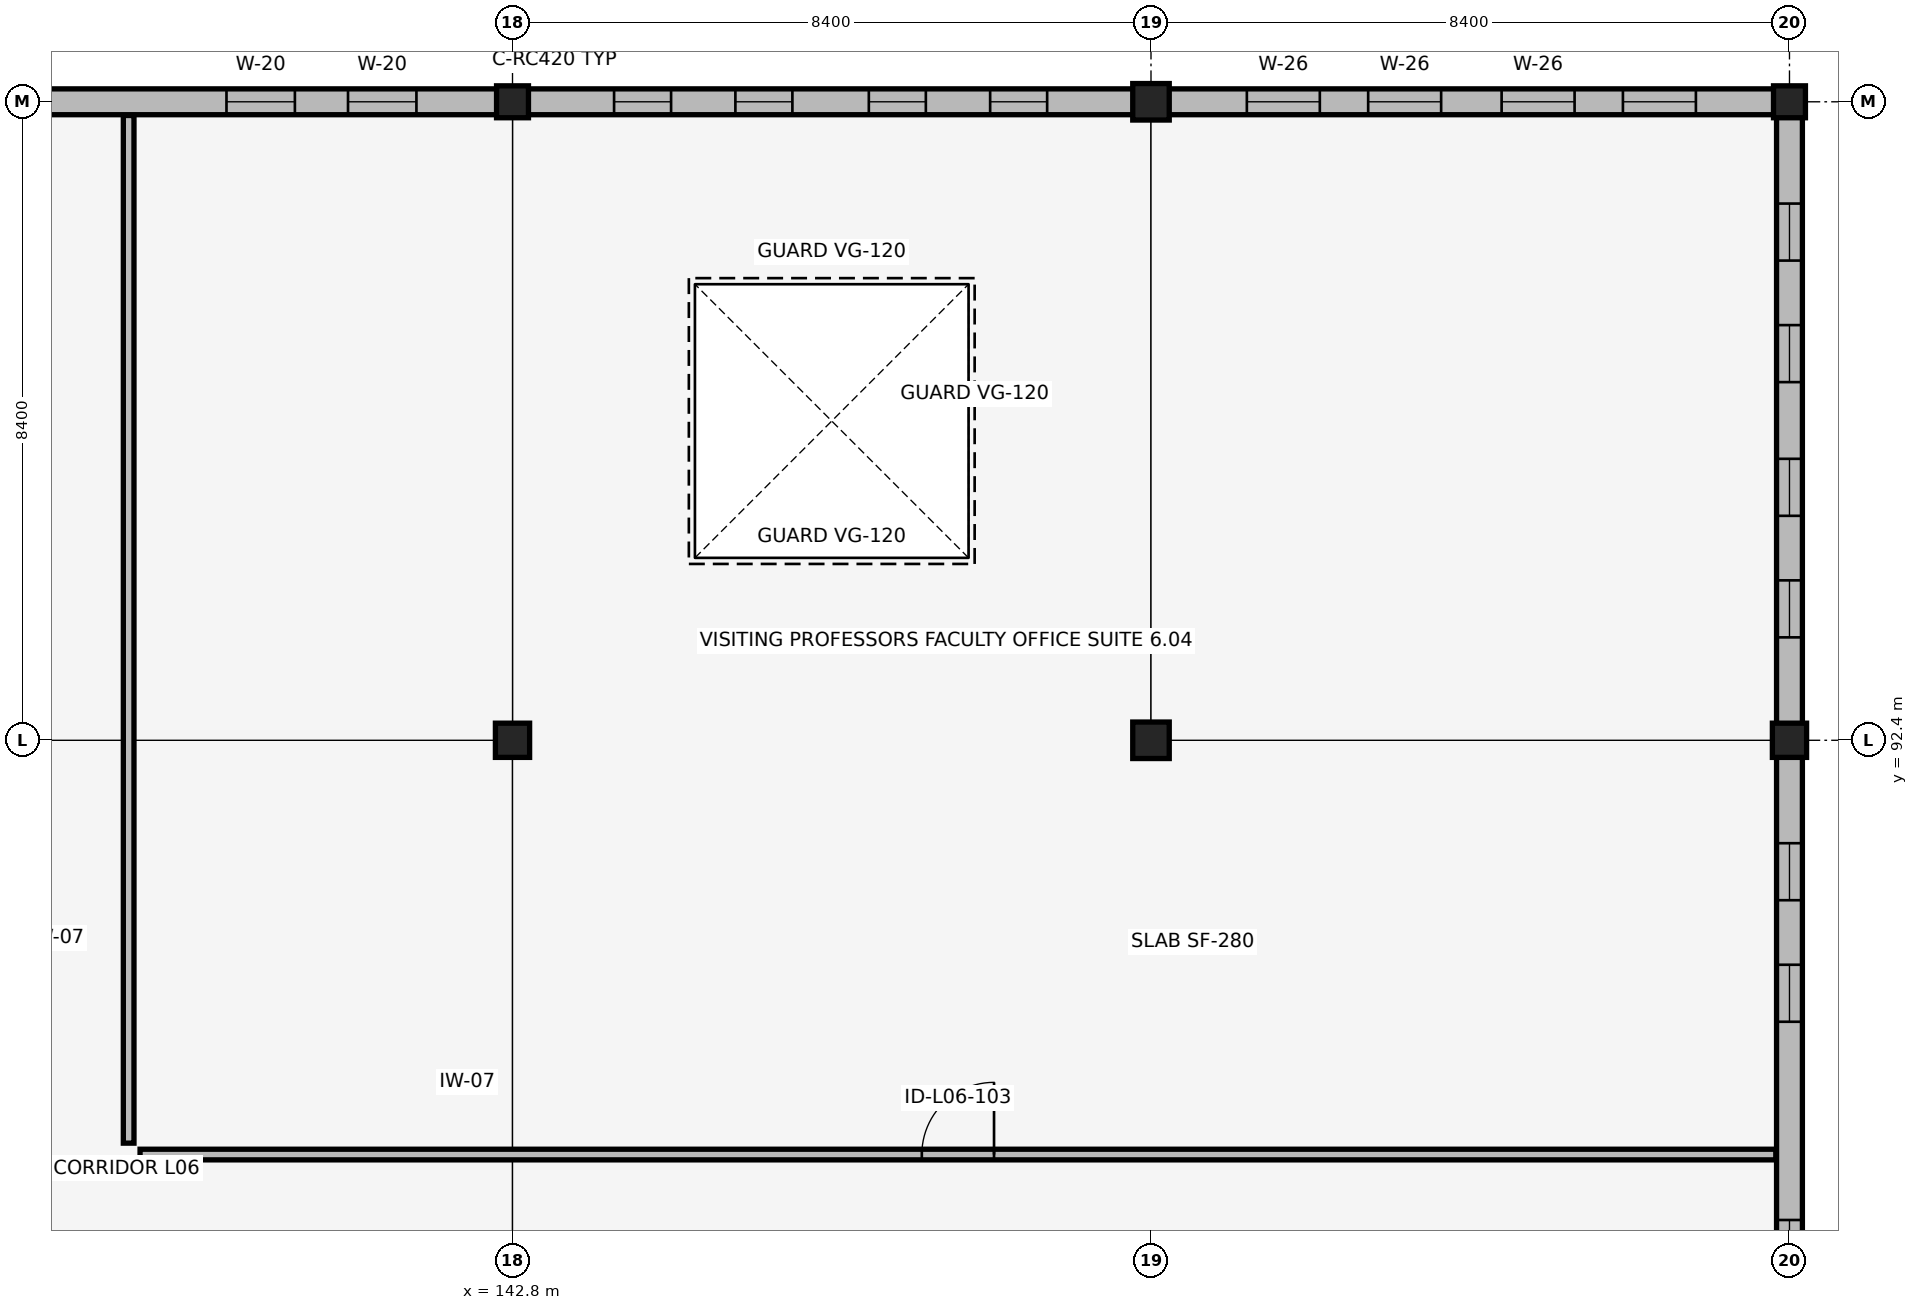
"""IFC4 building model, lengths in metres.
Left out: names, types, materials, properties, quantities, classifications, styles, units other than length and angle.
Written with IfcOpenShell. Run it as: python <this file> out.ifc"""

import sys

from ifc_helpers import new_model, si_unit, direction, frame, frame_2d, origin, origin_2d, place, context, subcontext, project, spatial, rectangle, extrude, element, fill, save


model = new_model("IFC4")
c1 = context("Model", 3, precision=1e-05, world=origin(), true_north=direction((0.0, 1.0)))
c2 = subcontext(c1, "Body", "Model", "MODEL_VIEW")
j1 = project(units=[si_unit("LENGTHUNIT", "METRE"), si_unit("PLANEANGLEUNIT", "RADIAN")], contexts=[c1])
p1 = place(None, origin())
s1 = spatial("IfcSite", under=j1, at=p1, CompositionType="ELEMENT")
p2 = place(p1, origin())
s2 = spatial("IfcBuilding", under=s1, at=p2, CompositionType="ELEMENT")
p3 = place(p2, frame((0.0, 0.0, 26.18)))
s3 = spatial("IfcBuildingStorey", under=s2, at=p3, CompositionType="ELEMENT", Elevation=26.18)
p4 = place(p3, frame((142.8, 92.4, 0.0), z_axis=(0.0, 0.0, 1.0), x_axis=(1.0, 0.0, 0.0)))
e1 = element("IfcColumn", 1, at=p4, inside=s3, PredefinedType="COLUMN", context=c2, shape_type="SweptSolid", body=[
    extrude(rectangle(XDim=0.45, YDim=0.45, at=origin_2d()), origin(), (0.0, 0.0, 1.0), 3.84),
])
p5 = place(p3, frame((142.8, 100.8, 0.0), z_axis=(0.0, 0.0, 1.0), x_axis=(1.0, 0.0, 0.0)))
e2 = element("IfcColumn", 2, at=p5, inside=s3, PredefinedType="COLUMN", context=c2, shape_type="SweptSolid", body=[
    extrude(rectangle(XDim=0.42, YDim=0.42, at=origin_2d()), origin(), (0.0, 0.0, 1.0), 3.84),
])
for number, where, z_axis, x_axis in (
    (3, (151.2, 92.4, 0.0), (0.0, 0.0, 1.0), (1.0, 0.0, 0.0)),
    (4, (151.2, 100.8, 0.0), (0.0, 0.0, 1.0), (1.0, 0.0, 0.0)),
):
    element("IfcColumn", number, at=place(p3, frame(where, z_axis=z_axis, x_axis=x_axis)), inside=s3, PredefinedType="COLUMN", context=c2, shape_type="SweptSolid", body=[
        extrude(rectangle(XDim=0.48, YDim=0.48, at=origin_2d()), origin(), (0.0, 0.0, 1.0), 3.84),
    ])
p6 = place(p3, frame((159.6, 92.4, 0.0), z_axis=(0.0, 0.0, 1.0), x_axis=(1.0, 0.0, 0.0)))
e5 = element("IfcColumn", 5, at=p6, inside=s3, PredefinedType="COLUMN", context=c2, shape_type="SweptSolid", body=[
    extrude(rectangle(XDim=0.45, YDim=0.45, at=origin_2d()), origin(), (0.0, 0.0, 1.0), 3.84),
])
p7 = place(p3, frame((159.6, 100.8, 0.0), z_axis=(0.0, 0.0, 1.0), x_axis=(1.0, 0.0, 0.0)))
e6 = element("IfcColumn", 6, at=p7, inside=s3, PredefinedType="COLUMN", context=c2, shape_type="SweptSolid", body=[
    extrude(rectangle(XDim=0.42, YDim=0.42, at=origin_2d()), origin(), (0.0, 0.0, 1.0), 3.84),
])
p8 = place(p3, frame((134.61, 100.8, 0.0), z_axis=(0.0, 0.0, 1.0), x_axis=(1.0, 0.0, 0.0)))
e7 = element("IfcWall", 7, at=p8, inside=s3, PredefinedType="SOLIDWALL", context=c2, shape_type="SweptSolid", body=[
    extrude(rectangle(XDim=7.995, YDim=0.34, at=frame_2d((3.998, 0.0))), origin(), (0.0, 0.0, 1.0), 3.84),
])
p9 = place(p8, frame((1.069, 0.0, 0.75)))
e8 = element("IfcOpeningElement", 8, at=p9, cuts=e7, PredefinedType="OPENING", context=c2, shape_type="SweptSolid", body=[
    extrude(rectangle(XDim=0.9, YDim=2.65, at=frame_2d((0.45, 1.325))), frame((0.0, 0.18, 0.0), z_axis=(0.0, -1.0, 0.0), x_axis=(1.0, 0.0, 0.0)), (0.0, 0.0, 1.0), 0.36),
])
p10 = place(p8, frame((4.427, 0.0, 0.75)))
e9 = element("IfcOpeningElement", 9, at=p10, cuts=e7, PredefinedType="OPENING", context=c2, shape_type="SweptSolid", body=[
    extrude(rectangle(XDim=0.9, YDim=2.65, at=frame_2d((0.45, 1.325))), frame((0.0, 0.18, 0.0), z_axis=(0.0, -1.0, 0.0), x_axis=(1.0, 0.0, 0.0)), (0.0, 0.0, 1.0), 0.36),
])
p11 = place(p8, frame((6.026, 0.0, 0.75)))
e10 = element("IfcOpeningElement", 10, at=p11, cuts=e7, PredefinedType="OPENING", context=c2, shape_type="SweptSolid", body=[
    extrude(rectangle(XDim=0.9, YDim=2.65, at=frame_2d((0.45, 1.325))), frame((0.0, 0.18, 0.0), z_axis=(0.0, -1.0, 0.0), x_axis=(1.0, 0.0, 0.0)), (0.0, 0.0, 1.0), 0.36),
])
p12 = place(p3, frame((142.995, 100.8, 0.0), z_axis=(0.0, 0.0, 1.0), x_axis=(1.0, 0.0, 0.0)))
e11 = element("IfcWall", 11, at=p12, inside=s3, PredefinedType="SOLIDWALL", context=c2, shape_type="SweptSolid", body=[
    extrude(rectangle(XDim=7.98, YDim=0.34, at=frame_2d((3.99, 0.0))), origin(), (0.0, 0.0, 1.0), 3.84),
])
p13 = place(p12, frame((1.141, 0.0, 0.75)))
e12 = element("IfcOpeningElement", 12, at=p13, cuts=e11, PredefinedType="OPENING", context=c2, shape_type="SweptSolid", body=[
    extrude(rectangle(XDim=0.75, YDim=2.1, at=frame_2d((0.375, 1.05))), frame((0.0, 0.18, 0.0), z_axis=(0.0, -1.0, 0.0), x_axis=(1.0, 0.0, 0.0)), (0.0, 0.0, 1.0), 0.36),
])
p14 = place(p12, frame((2.737, 0.0, 0.75)))
e13 = element("IfcOpeningElement", 13, at=p14, cuts=e11, PredefinedType="OPENING", context=c2, shape_type="SweptSolid", body=[
    extrude(rectangle(XDim=0.75, YDim=2.1, at=frame_2d((0.375, 1.05))), frame((0.0, 0.18, 0.0), z_axis=(0.0, -1.0, 0.0), x_axis=(1.0, 0.0, 0.0)), (0.0, 0.0, 1.0), 0.36),
])
p15 = place(p12, frame((4.493, 0.0, 0.75)))
e14 = element("IfcOpeningElement", 14, at=p15, cuts=e11, PredefinedType="OPENING", context=c2, shape_type="SweptSolid", body=[
    extrude(rectangle(XDim=0.75, YDim=2.1, at=frame_2d((0.375, 1.05))), frame((0.0, 0.18, 0.0), z_axis=(0.0, -1.0, 0.0), x_axis=(1.0, 0.0, 0.0)), (0.0, 0.0, 1.0), 0.36),
])
p16 = place(p12, frame((6.089, 0.0, 0.75)))
e15 = element("IfcOpeningElement", 15, at=p16, cuts=e11, PredefinedType="OPENING", context=c2, shape_type="SweptSolid", body=[
    extrude(rectangle(XDim=0.75, YDim=2.1, at=frame_2d((0.375, 1.05))), frame((0.0, 0.18, 0.0), z_axis=(0.0, -1.0, 0.0), x_axis=(1.0, 0.0, 0.0)), (0.0, 0.0, 1.0), 0.36),
])
p17 = place(p3, frame((159.6, 84.195, 0.0), z_axis=(0.0, 0.0, 1.0), x_axis=(0.0, 1.0, 0.0)))
e16 = element("IfcWall", 16, at=p17, inside=s3, PredefinedType="SOLIDWALL", context=c2, shape_type="SweptSolid", body=[
    extrude(rectangle(XDim=7.995, YDim=0.34, at=frame_2d((3.998, 0.0))), origin(), (0.0, 0.0, 1.0), 3.48),
])
p18 = place(p17, frame((1.144, 0.0, 0.75)))
e17 = element("IfcOpeningElement", 17, at=p18, cuts=e16, PredefinedType="OPENING", context=c2, shape_type="SweptSolid", body=[
    extrude(rectangle(XDim=0.75, YDim=2.1, at=frame_2d((0.375, 1.05))), frame((0.0, 0.18, 0.0), z_axis=(0.0, -1.0, 0.0), x_axis=(1.0, 0.0, 0.0)), (0.0, 0.0, 1.0), 0.36),
])
p19 = place(p17, frame((4.502, 0.0, 0.75)))
e18 = element("IfcOpeningElement", 18, at=p19, cuts=e16, PredefinedType="OPENING", context=c2, shape_type="SweptSolid", body=[
    extrude(rectangle(XDim=0.75, YDim=2.1, at=frame_2d((0.375, 1.05))), frame((0.0, 0.18, 0.0), z_axis=(0.0, -1.0, 0.0), x_axis=(1.0, 0.0, 0.0)), (0.0, 0.0, 1.0), 0.36),
])
p20 = place(p17, frame((6.101, 0.0, 0.75)))
e19 = element("IfcOpeningElement", 19, at=p20, cuts=e16, PredefinedType="OPENING", context=c2, shape_type="SweptSolid", body=[
    extrude(rectangle(XDim=0.75, YDim=2.1, at=frame_2d((0.375, 1.05))), frame((0.0, 0.18, 0.0), z_axis=(0.0, -1.0, 0.0), x_axis=(1.0, 0.0, 0.0)), (0.0, 0.0, 1.0), 0.36),
])
p21 = place(p3, frame((151.425, 100.8, 0.0), z_axis=(0.0, 0.0, 1.0), x_axis=(1.0, 0.0, 0.0)))
e20 = element("IfcWall", 20, at=p21, inside=s3, PredefinedType="SOLIDWALL", context=c2, shape_type="SweptSolid", body=[
    extrude(rectangle(XDim=7.98, YDim=0.34, at=frame_2d((3.99, 0.0))), origin(), (0.0, 0.0, 1.0), 3.84),
])
p22 = place(p21, frame((1.036, 0.0, 0.75)))
e21 = element("IfcOpeningElement", 21, at=p22, cuts=e20, PredefinedType="OPENING", context=c2, shape_type="SweptSolid", body=[
    extrude(rectangle(XDim=0.96, YDim=2.75, at=frame_2d((0.48, 1.375))), frame((0.0, 0.18, 0.0), z_axis=(0.0, -1.0, 0.0), x_axis=(1.0, 0.0, 0.0)), (0.0, 0.0, 1.0), 0.36),
])
p23 = place(p21, frame((2.632, 0.0, 0.75)))
e22 = element("IfcOpeningElement", 22, at=p23, cuts=e20, PredefinedType="OPENING", context=c2, shape_type="SweptSolid", body=[
    extrude(rectangle(XDim=0.96, YDim=2.75, at=frame_2d((0.48, 1.375))), frame((0.0, 0.18, 0.0), z_axis=(0.0, -1.0, 0.0), x_axis=(1.0, 0.0, 0.0)), (0.0, 0.0, 1.0), 0.36),
])
p24 = place(p21, frame((4.388, 0.0, 0.75)))
e23 = element("IfcOpeningElement", 23, at=p24, cuts=e20, PredefinedType="OPENING", context=c2, shape_type="SweptSolid", body=[
    extrude(rectangle(XDim=0.96, YDim=2.75, at=frame_2d((0.48, 1.375))), frame((0.0, 0.18, 0.0), z_axis=(0.0, -1.0, 0.0), x_axis=(1.0, 0.0, 0.0)), (0.0, 0.0, 1.0), 0.36),
])
p25 = place(p21, frame((5.984, 0.0, 0.75)))
e24 = element("IfcOpeningElement", 24, at=p25, cuts=e20, PredefinedType="OPENING", context=c2, shape_type="SweptSolid", body=[
    extrude(rectangle(XDim=0.96, YDim=2.75, at=frame_2d((0.48, 1.375))), frame((0.0, 0.18, 0.0), z_axis=(0.0, -1.0, 0.0), x_axis=(1.0, 0.0, 0.0)), (0.0, 0.0, 1.0), 0.36),
])
p26 = place(p3, frame((159.6, 92.61, 0.0), z_axis=(0.0, 0.0, 1.0), x_axis=(0.0, 1.0, 0.0)))
e25 = element("IfcWall", 25, at=p26, inside=s3, PredefinedType="SOLIDWALL", context=c2, shape_type="SweptSolid", body=[
    extrude(rectangle(XDim=7.995, YDim=0.34, at=frame_2d((3.998, 0.0))), origin(), (0.0, 0.0, 1.0), 3.48),
])
p27 = place(p26, frame((1.144, 0.0, 0.75)))
e26 = element("IfcOpeningElement", 26, at=p27, cuts=e25, PredefinedType="OPENING", context=c2, shape_type="SweptSolid", body=[
    extrude(rectangle(XDim=0.75, YDim=2.1, at=frame_2d((0.375, 1.05))), frame((0.0, 0.18, 0.0), z_axis=(0.0, -1.0, 0.0), x_axis=(1.0, 0.0, 0.0)), (0.0, 0.0, 1.0), 0.36),
])
p28 = place(p26, frame((2.743, 0.0, 0.75)))
e27 = element("IfcOpeningElement", 27, at=p28, cuts=e25, PredefinedType="OPENING", context=c2, shape_type="SweptSolid", body=[
    extrude(rectangle(XDim=0.75, YDim=2.1, at=frame_2d((0.375, 1.05))), frame((0.0, 0.18, 0.0), z_axis=(0.0, -1.0, 0.0), x_axis=(1.0, 0.0, 0.0)), (0.0, 0.0, 1.0), 0.36),
])
p29 = place(p26, frame((4.502, 0.0, 0.75)))
e28 = element("IfcOpeningElement", 28, at=p29, cuts=e25, PredefinedType="OPENING", context=c2, shape_type="SweptSolid", body=[
    extrude(rectangle(XDim=0.75, YDim=2.1, at=frame_2d((0.375, 1.05))), frame((0.0, 0.18, 0.0), z_axis=(0.0, -1.0, 0.0), x_axis=(1.0, 0.0, 0.0)), (0.0, 0.0, 1.0), 0.36),
])
p30 = place(p26, frame((6.101, 0.0, 0.75)))
e29 = element("IfcOpeningElement", 29, at=p30, cuts=e25, PredefinedType="OPENING", context=c2, shape_type="SweptSolid", body=[
    extrude(rectangle(XDim=0.75, YDim=2.1, at=frame_2d((0.375, 1.05))), frame((0.0, 0.18, 0.0), z_axis=(0.0, -1.0, 0.0), x_axis=(1.0, 0.0, 0.0)), (0.0, 0.0, 1.0), 0.36),
])
p31 = place(p3, frame((137.9, 86.95, 0.0), z_axis=(0.0, 0.0, 1.0), x_axis=(1.0, 0.0, 0.0)))
e30 = element("IfcWall", 30, at=p31, inside=s3, PredefinedType="PARTITIONING", context=c2, shape_type="SweptSolid", body=[
    extrude(rectangle(XDim=21.52, YDim=0.14, at=frame_2d((10.76, 0.0))), origin(), (0.0, 0.0, 1.0), 3.48),
])
p32 = place(p31, frame((10.285, 0.0, 0.0)))
e31 = element("IfcOpeningElement", 31, at=p32, cuts=e30, PredefinedType="OPENING", context=c2, shape_type="SweptSolid", body=[
    extrude(rectangle(XDim=0.95, YDim=2.1, at=frame_2d((0.475, 1.05))), frame((0.0, 0.08, 0.0), z_axis=(0.0, -1.0, 0.0), x_axis=(1.0, 0.0, 0.0)), (0.0, 0.0, 1.0), 0.16),
])
p33 = place(p3, frame((137.75, 87.1, 0.0), z_axis=(0.0, 0.0, 1.0), x_axis=(0.0, 1.0, 0.0)))
e32 = element("IfcWall", 32, at=p33, inside=s3, PredefinedType="PARTITIONING", context=c2, shape_type="SweptSolid", body=[
    extrude(rectangle(XDim=13.52, YDim=0.14, at=frame_2d((6.76, 0.0))), origin(), (0.0, 0.0, 1.0), 3.84),
])
p34 = place(p10, origin())
e33 = element("IfcWindow", 33, at=p34, inside=s3, PartitioningType="DOUBLE_PANEL_VERTICAL", PredefinedType="WINDOW", context=c2, shape_type="SweptSolid", body=[
    extrude(rectangle(XDim=0.9, YDim=2.65, at=frame_2d((0.45, 1.325))), frame((0.0, 0.03, 0.0), z_axis=(0.0, -1.0, 0.0), x_axis=(1.0, 0.0, 0.0)), (0.0, 0.0, 1.0), 0.06),
])
fill(e9, e33)
p35 = place(p11, origin())
e34 = element("IfcWindow", 34, at=p35, inside=s3, PartitioningType="DOUBLE_PANEL_VERTICAL", PredefinedType="WINDOW", context=c2, shape_type="SweptSolid", body=[
    extrude(rectangle(XDim=0.9, YDim=2.65, at=frame_2d((0.45, 1.325))), frame((0.0, 0.03, 0.0), z_axis=(0.0, -1.0, 0.0), x_axis=(1.0, 0.0, 0.0)), (0.0, 0.0, 1.0), 0.06),
])
fill(e10, e34)
p36 = place(p13, origin())
e35 = element("IfcWindow", 35, at=p36, inside=s3, PartitioningType="DOUBLE_PANEL_VERTICAL", PredefinedType="WINDOW", context=c2, shape_type="SweptSolid", body=[
    extrude(rectangle(XDim=0.75, YDim=2.1, at=frame_2d((0.375, 1.05))), frame((0.0, 0.03, 0.0), z_axis=(0.0, -1.0, 0.0), x_axis=(1.0, 0.0, 0.0)), (0.0, 0.0, 1.0), 0.06),
])
fill(e12, e35)
p37 = place(p14, origin())
e36 = element("IfcWindow", 36, at=p37, inside=s3, PartitioningType="DOUBLE_PANEL_VERTICAL", PredefinedType="WINDOW", context=c2, shape_type="SweptSolid", body=[
    extrude(rectangle(XDim=0.75, YDim=2.1, at=frame_2d((0.375, 1.05))), frame((0.0, 0.03, 0.0), z_axis=(0.0, -1.0, 0.0), x_axis=(1.0, 0.0, 0.0)), (0.0, 0.0, 1.0), 0.06),
])
fill(e13, e36)
p38 = place(p15, origin())
e37 = element("IfcWindow", 37, at=p38, inside=s3, PartitioningType="DOUBLE_PANEL_VERTICAL", PredefinedType="WINDOW", context=c2, shape_type="SweptSolid", body=[
    extrude(rectangle(XDim=0.75, YDim=2.1, at=frame_2d((0.375, 1.05))), frame((0.0, 0.03, 0.0), z_axis=(0.0, -1.0, 0.0), x_axis=(1.0, 0.0, 0.0)), (0.0, 0.0, 1.0), 0.06),
])
fill(e14, e37)
p39 = place(p16, origin())
e38 = element("IfcWindow", 38, at=p39, inside=s3, PartitioningType="DOUBLE_PANEL_VERTICAL", PredefinedType="WINDOW", context=c2, shape_type="SweptSolid", body=[
    extrude(rectangle(XDim=0.75, YDim=2.1, at=frame_2d((0.375, 1.05))), frame((0.0, 0.03, 0.0), z_axis=(0.0, -1.0, 0.0), x_axis=(1.0, 0.0, 0.0)), (0.0, 0.0, 1.0), 0.06),
])
fill(e15, e38)
p40 = place(p18, origin())
e39 = element("IfcWindow", 39, at=p40, inside=s3, PartitioningType="DOUBLE_PANEL_VERTICAL", PredefinedType="WINDOW", context=c2, shape_type="SweptSolid", body=[
    extrude(rectangle(XDim=0.75, YDim=2.1, at=frame_2d((0.375, 1.05))), frame((0.0, 0.03, 0.0), z_axis=(0.0, -1.0, 0.0), x_axis=(1.0, 0.0, 0.0)), (0.0, 0.0, 1.0), 0.06),
])
fill(e17, e39)
p41 = place(p19, origin())
e40 = element("IfcWindow", 40, at=p41, inside=s3, PartitioningType="DOUBLE_PANEL_VERTICAL", PredefinedType="WINDOW", context=c2, shape_type="SweptSolid", body=[
    extrude(rectangle(XDim=0.75, YDim=2.1, at=frame_2d((0.375, 1.05))), frame((0.0, 0.03, 0.0), z_axis=(0.0, -1.0, 0.0), x_axis=(1.0, 0.0, 0.0)), (0.0, 0.0, 1.0), 0.06),
])
fill(e18, e40)
p42 = place(p20, origin())
e41 = element("IfcWindow", 41, at=p42, inside=s3, PartitioningType="DOUBLE_PANEL_VERTICAL", PredefinedType="WINDOW", context=c2, shape_type="SweptSolid", body=[
    extrude(rectangle(XDim=0.75, YDim=2.1, at=frame_2d((0.375, 1.05))), frame((0.0, 0.03, 0.0), z_axis=(0.0, -1.0, 0.0), x_axis=(1.0, 0.0, 0.0)), (0.0, 0.0, 1.0), 0.06),
])
fill(e19, e41)
p43 = place(p22, origin())
e42 = element("IfcWindow", 42, at=p43, inside=s3, PartitioningType="DOUBLE_PANEL_VERTICAL", PredefinedType="WINDOW", context=c2, shape_type="SweptSolid", body=[
    extrude(rectangle(XDim=0.96, YDim=2.75, at=frame_2d((0.48, 1.375))), frame((0.0, 0.03, 0.0), z_axis=(0.0, -1.0, 0.0), x_axis=(1.0, 0.0, 0.0)), (0.0, 0.0, 1.0), 0.06),
])
fill(e21, e42)
p44 = place(p23, origin())
e43 = element("IfcWindow", 43, at=p44, inside=s3, PartitioningType="DOUBLE_PANEL_VERTICAL", PredefinedType="WINDOW", context=c2, shape_type="SweptSolid", body=[
    extrude(rectangle(XDim=0.96, YDim=2.75, at=frame_2d((0.48, 1.375))), frame((0.0, 0.03, 0.0), z_axis=(0.0, -1.0, 0.0), x_axis=(1.0, 0.0, 0.0)), (0.0, 0.0, 1.0), 0.06),
])
fill(e22, e43)
p45 = place(p24, origin())
e44 = element("IfcWindow", 44, at=p45, inside=s3, PartitioningType="DOUBLE_PANEL_VERTICAL", PredefinedType="WINDOW", context=c2, shape_type="SweptSolid", body=[
    extrude(rectangle(XDim=0.96, YDim=2.75, at=frame_2d((0.48, 1.375))), frame((0.0, 0.03, 0.0), z_axis=(0.0, -1.0, 0.0), x_axis=(1.0, 0.0, 0.0)), (0.0, 0.0, 1.0), 0.06),
])
fill(e23, e44)
p46 = place(p25, origin())
e45 = element("IfcWindow", 45, at=p46, inside=s3, PartitioningType="DOUBLE_PANEL_VERTICAL", PredefinedType="WINDOW", context=c2, shape_type="SweptSolid", body=[
    extrude(rectangle(XDim=0.96, YDim=2.75, at=frame_2d((0.48, 1.375))), frame((0.0, 0.03, 0.0), z_axis=(0.0, -1.0, 0.0), x_axis=(1.0, 0.0, 0.0)), (0.0, 0.0, 1.0), 0.06),
])
fill(e24, e45)
p47 = place(p27, origin())
e46 = element("IfcWindow", 46, at=p47, inside=s3, PartitioningType="DOUBLE_PANEL_VERTICAL", PredefinedType="WINDOW", context=c2, shape_type="SweptSolid", body=[
    extrude(rectangle(XDim=0.75, YDim=2.1, at=frame_2d((0.375, 1.05))), frame((0.0, 0.03, 0.0), z_axis=(0.0, -1.0, 0.0), x_axis=(1.0, 0.0, 0.0)), (0.0, 0.0, 1.0), 0.06),
])
fill(e26, e46)
p48 = place(p28, origin())
e47 = element("IfcWindow", 47, at=p48, inside=s3, PartitioningType="DOUBLE_PANEL_VERTICAL", PredefinedType="WINDOW", context=c2, shape_type="SweptSolid", body=[
    extrude(rectangle(XDim=0.75, YDim=2.1, at=frame_2d((0.375, 1.05))), frame((0.0, 0.03, 0.0), z_axis=(0.0, -1.0, 0.0), x_axis=(1.0, 0.0, 0.0)), (0.0, 0.0, 1.0), 0.06),
])
fill(e27, e47)
p49 = place(p29, origin())
e48 = element("IfcWindow", 48, at=p49, inside=s3, PartitioningType="DOUBLE_PANEL_VERTICAL", PredefinedType="WINDOW", context=c2, shape_type="SweptSolid", body=[
    extrude(rectangle(XDim=0.75, YDim=2.1, at=frame_2d((0.375, 1.05))), frame((0.0, 0.03, 0.0), z_axis=(0.0, -1.0, 0.0), x_axis=(1.0, 0.0, 0.0)), (0.0, 0.0, 1.0), 0.06),
])
fill(e28, e48)
p50 = place(p30, origin())
e49 = element("IfcWindow", 49, at=p50, inside=s3, PartitioningType="DOUBLE_PANEL_VERTICAL", PredefinedType="WINDOW", context=c2, shape_type="SweptSolid", body=[
    extrude(rectangle(XDim=0.75, YDim=2.1, at=frame_2d((0.375, 1.05))), frame((0.0, 0.03, 0.0), z_axis=(0.0, -1.0, 0.0), x_axis=(1.0, 0.0, 0.0)), (0.0, 0.0, 1.0), 0.06),
])
fill(e29, e49)
p51 = place(p32, origin())
e50 = element("IfcDoor", 50, at=p51, inside=s3, OperationType="SINGLE_SWING_RIGHT", PredefinedType="DOOR", context=c2, shape_type="SweptSolid", body=[
    extrude(rectangle(XDim=0.95, YDim=2.1, at=frame_2d((0.475, 1.05))), frame((0.0, 0.025, 0.0), z_axis=(0.0, -1.0, 0.0), x_axis=(1.0, 0.0, 0.0)), (0.0, 0.0, 1.0), 0.05),
])
fill(e31, e50)
save(model, sys.argv[1])
